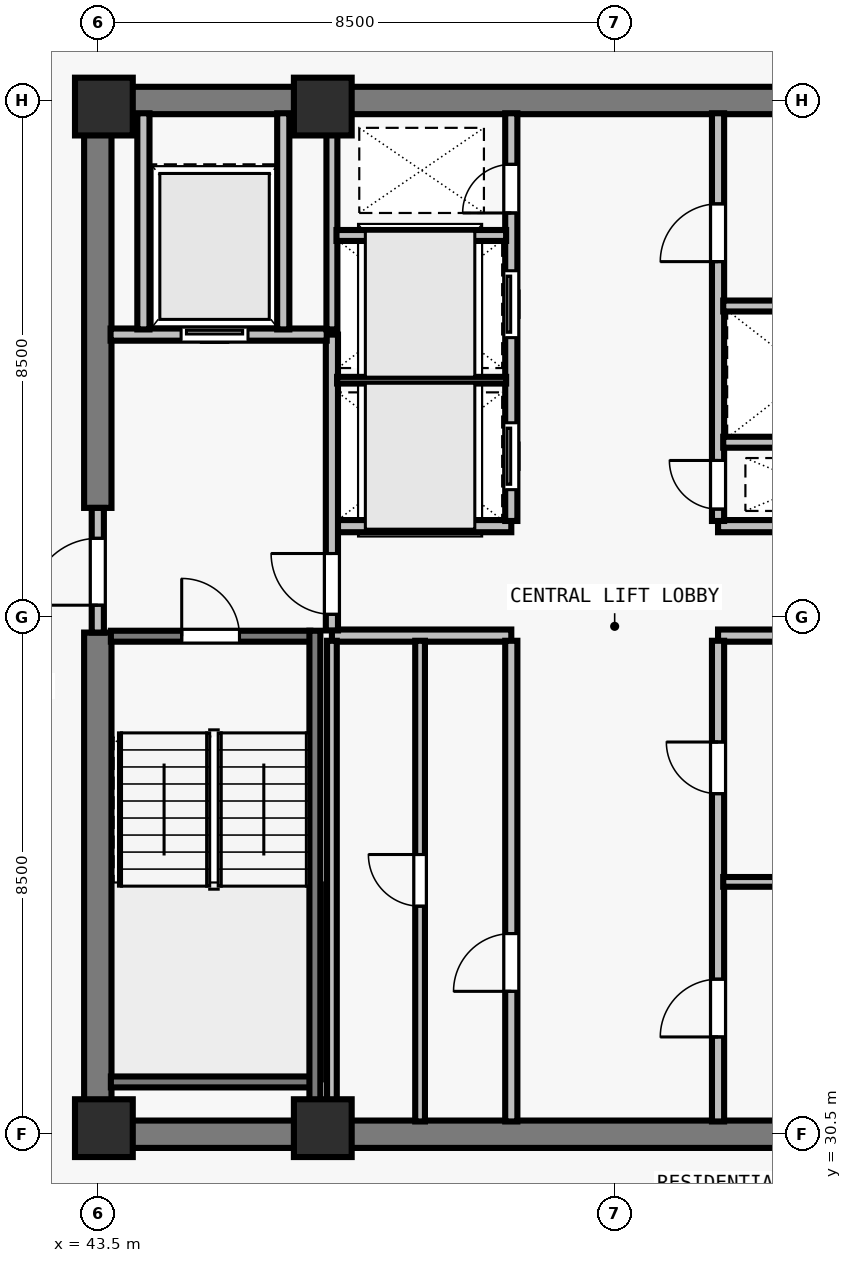
"""IFC4 building model, lengths in metres.
Left out: names, types, materials, properties, quantities, classifications, styles, units other than length and angle.
Written with IfcOpenShell. Run it as: python <this file> out.ifc"""

import sys

from ifc_helpers import new_model, si_unit, direction, frame, frame_2d, origin, origin_2d, place, context, subcontext, project, spatial, rectangle, extrude, element, fill, save


model = new_model("IFC4")
c1 = context("Model", 3, precision=1e-05, world=origin(), true_north=direction((0.0, 1.0)))
c2 = subcontext(c1, "Body", "Model", "MODEL_VIEW")
j1 = project(units=[si_unit("LENGTHUNIT", "METRE"), si_unit("PLANEANGLEUNIT", "RADIAN")], contexts=[c1])
p1 = place(None, origin())
s1 = spatial("IfcSite", under=j1, at=p1, CompositionType="ELEMENT")
p2 = place(p1, origin())
s2 = spatial("IfcBuilding", under=s1, at=p2, CompositionType="ELEMENT")
p3 = place(p2, frame((0.0, 0.0, 209.5)))
s3 = spatial("IfcBuildingStorey", under=s2, at=p3, CompositionType="ELEMENT", Elevation=209.5)
for number, where, z_axis, x_axis in (
    (1, (43.6, 30.6, 0.0), (0.0, 0.0, 1.0), (1.0, 0.0, 0.0)),
    (2, (47.2, 30.6, 0.0), (0.0, 0.0, 1.0), (1.0, 0.0, 0.0)),
    (3, (43.6, 47.4, 0.0), (0.0, 0.0, 1.0), (1.0, 0.0, 0.0)),
    (4, (47.2, 47.4, 0.0), (0.0, 0.0, 1.0), (1.0, 0.0, 0.0)),
):
    element("IfcColumn", number, at=place(p3, frame(where, z_axis=z_axis, x_axis=x_axis)), inside=s3, PredefinedType="COLUMN", context=c2, shape_type="SweptSolid", body=[
        extrude(rectangle(XDim=0.95, YDim=0.95, at=origin_2d()), origin(), (0.0, 0.0, 1.0), 3.5),
    ])
for number, where, z_axis, x_axis in (
    (5, (43.275, 30.5, 0.0), (0.0, 0.0, 1.0), (1.0, 0.0, 0.0)),
    (6, (43.275, 47.5, 0.0), (0.0, 0.0, 1.0), (1.0, 0.0, 0.0)),
):
    element("IfcWall", number, at=place(p3, frame(where, z_axis=z_axis, x_axis=x_axis)), inside=s3, PredefinedType="SHEAR", context=c2, shape_type="SweptSolid", body=[
        extrude(rectangle(XDim=17.45, YDim=0.45, at=frame_2d((8.725, 0.0))), origin(), (0.0, 0.0, 1.0), 3.29),
    ])
p4 = place(p3, frame((43.5, 30.715, 0.0), z_axis=(0.0, 0.0, 1.0), x_axis=(0.0, 1.0, 0.0)))
e7 = element("IfcWall", 7, at=p4, inside=s3, PredefinedType="SHEAR", context=c2, shape_type="SweptSolid", body=[
    extrude(rectangle(XDim=8.035, YDim=0.45, at=frame_2d((4.018, 0.0))), origin(), (0.0, 0.0, 1.0), 3.29),
])
p5 = place(p3, frame((43.5, 40.8, 0.0), z_axis=(0.0, 0.0, 1.0), x_axis=(0.0, 1.0, 0.0)))
e8 = element("IfcWall", 8, at=p5, inside=s3, PredefinedType="SHEAR", context=c2, shape_type="SweptSolid", body=[
    extrude(rectangle(XDim=6.485, YDim=0.45, at=frame_2d((3.242, 0.0))), origin(), (0.0, 0.0, 1.0), 3.29),
])
for number, where, z_axis, x_axis in (
    (9, (47.35, 38.7, 0.0), (0.0, 0.0, 1.0), (1.0, 0.0, 0.0)),
    (10, (47.35, 40.5, 0.0), (0.0, 0.0, 1.0), (1.0, 0.0, 0.0)),
    (11, (53.7, 38.7, 0.0), (0.0, 0.0, 1.0), (1.0, 0.0, 0.0)),
    (12, (53.7, 40.5, 0.0), (0.0, 0.0, 1.0), (1.0, 0.0, 0.0)),
):
    element("IfcWall", number, at=place(p3, frame(where, z_axis=z_axis, x_axis=x_axis)), inside=s3, PredefinedType="SOLIDWALL", context=c2, shape_type="SweptSolid", body=[
        extrude(rectangle(XDim=2.95, YDim=0.2, at=frame_2d((1.475, 0.0))), origin(), (0.0, 0.0, 1.0), 3.29),
    ])
p6 = place(p3, frame((50.3, 30.71, 0.0), z_axis=(0.0, 0.0, 1.0), x_axis=(0.0, 1.0, 0.0)))
e13 = element("IfcWall", 13, at=p6, inside=s3, PredefinedType="SOLIDWALL", context=c2, shape_type="SweptSolid", body=[
    extrude(rectangle(XDim=7.905, YDim=0.2, at=frame_2d((3.953, 0.0))), origin(), (0.0, 0.0, 1.0), 3.29),
])
p7 = place(p6, frame((2.14, 0.0, 0.0)))
e14 = element("IfcOpeningElement", 14, at=p7, cuts=e13, PredefinedType="OPENING", context=c2, shape_type="SweptSolid", body=[
    extrude(rectangle(XDim=0.95, YDim=2.12, at=frame_2d((0.475, 1.06))), frame((0.0, 0.11, 0.0), z_axis=(0.0, -1.0, 0.0), x_axis=(1.0, 0.0, 0.0)), (0.0, 0.0, 1.0), 0.22),
])
p8 = place(p3, frame((53.7, 30.71, 0.0), z_axis=(0.0, 0.0, 1.0), x_axis=(0.0, 1.0, 0.0)))
e15 = element("IfcWall", 15, at=p8, inside=s3, PredefinedType="SOLIDWALL", context=c2, shape_type="SweptSolid", body=[
    extrude(rectangle(XDim=7.905, YDim=0.2, at=frame_2d((3.953, 0.0))), origin(), (0.0, 0.0, 1.0), 3.29),
])
p9 = place(p8, frame((1.39, 0.0, 0.0)))
e16 = element("IfcOpeningElement", 16, at=p9, cuts=e15, PredefinedType="OPENING", context=c2, shape_type="SweptSolid", body=[
    extrude(rectangle(XDim=0.95, YDim=2.12, at=frame_2d((0.475, 1.06))), frame((0.0, 0.11, 0.0), z_axis=(0.0, -1.0, 0.0), x_axis=(1.0, 0.0, 0.0)), (0.0, 0.0, 1.0), 0.22),
])
p10 = place(p8, frame((5.39, 0.0, 0.0)))
e17 = element("IfcOpeningElement", 17, at=p10, cuts=e15, PredefinedType="OPENING", context=c2, shape_type="SweptSolid", body=[
    extrude(rectangle(XDim=0.85, YDim=2.12, at=frame_2d((0.425, 1.06))), frame((0.0, 0.11, 0.0), z_axis=(0.0, -1.0, 0.0), x_axis=(1.0, 0.0, 0.0)), (0.0, 0.0, 1.0), 0.22),
])
p11 = place(p3, frame((50.3, 40.585, 0.0), z_axis=(0.0, 0.0, 1.0), x_axis=(0.0, 1.0, 0.0)))
e18 = element("IfcWall", 18, at=p11, inside=s3, PredefinedType="SOLIDWALL", context=c2, shape_type="SweptSolid", body=[
    extrude(rectangle(XDim=6.705, YDim=0.2, at=frame_2d((3.353, 0.0))), origin(), (0.0, 0.0, 1.0), 3.29),
])
p12 = place(p11, frame((0.515, 0.0, 0.0)))
e19 = element("IfcOpeningElement", 19, at=p12, cuts=e18, PredefinedType="OPENING", context=c2, shape_type="SweptSolid", body=[
    extrude(rectangle(XDim=1.1, YDim=2.2, at=frame_2d((0.55, 1.1))), frame((0.0, 0.11, 0.0), z_axis=(0.0, -1.0, 0.0), x_axis=(1.0, 0.0, 0.0)), (0.0, 0.0, 1.0), 0.22),
])
p13 = place(p11, frame((3.015, 0.0, 0.0)))
e20 = element("IfcOpeningElement", 20, at=p13, cuts=e18, PredefinedType="OPENING", context=c2, shape_type="SweptSolid", body=[
    extrude(rectangle(XDim=1.1, YDim=2.2, at=frame_2d((0.55, 1.1))), frame((0.0, 0.11, 0.0), z_axis=(0.0, -1.0, 0.0), x_axis=(1.0, 0.0, 0.0)), (0.0, 0.0, 1.0), 0.22),
])
p14 = place(p11, frame((5.065, 0.0, 0.0)))
e21 = element("IfcOpeningElement", 21, at=p14, cuts=e18, PredefinedType="OPENING", context=c2, shape_type="SweptSolid", body=[
    extrude(rectangle(XDim=0.8, YDim=2.08, at=frame_2d((0.4, 1.04))), frame((0.0, 0.11, 0.0), z_axis=(0.0, -1.0, 0.0), x_axis=(1.0, 0.0, 0.0)), (0.0, 0.0, 1.0), 0.22),
])
p15 = place(p3, frame((53.7, 40.585, 0.0), z_axis=(0.0, 0.0, 1.0), x_axis=(0.0, 1.0, 0.0)))
e22 = element("IfcWall", 22, at=p15, inside=s3, PredefinedType="SOLIDWALL", context=c2, shape_type="SweptSolid", body=[
    extrude(rectangle(XDim=6.705, YDim=0.2, at=frame_2d((3.353, 0.0))), origin(), (0.0, 0.0, 1.0), 3.29),
])
p16 = place(p15, frame((0.195, 0.0, 0.0)))
e23 = element("IfcOpeningElement", 23, at=p16, cuts=e22, PredefinedType="OPENING", context=c2, shape_type="SweptSolid", body=[
    extrude(rectangle(XDim=0.8, YDim=2.08, at=frame_2d((0.4, 1.04))), frame((0.0, 0.11, 0.0), z_axis=(0.0, -1.0, 0.0), x_axis=(1.0, 0.0, 0.0)), (0.0, 0.0, 1.0), 0.22),
])
p17 = place(p15, frame((4.265, 0.0, 0.0)))
e24 = element("IfcOpeningElement", 24, at=p17, cuts=e22, PredefinedType="OPENING", context=c2, shape_type="SweptSolid", body=[
    extrude(rectangle(XDim=0.95, YDim=2.12, at=frame_2d((0.475, 1.06))), frame((0.0, 0.11, 0.0), z_axis=(0.0, -1.0, 0.0), x_axis=(1.0, 0.0, 0.0)), (0.0, 0.0, 1.0), 0.22),
])
p18 = place(p3, frame((43.5, 38.75, 0.0), z_axis=(0.0, 0.0, 1.0), x_axis=(0.0, 1.0, 0.0)))
e25 = element("IfcWall", 25, at=p18, inside=s3, PredefinedType="SOLIDWALL", context=c2, shape_type="SweptSolid", body=[
    extrude(rectangle(XDim=2.05, YDim=0.2, at=frame_2d((1.025, 0.0))), origin(), (0.0, 0.0, 1.0), 3.29),
])
p19 = place(p18, frame((0.45, 0.0, 0.0)))
e26 = element("IfcOpeningElement", 26, at=p19, cuts=e25, PredefinedType="OPENING", context=c2, shape_type="SweptSolid", body=[
    extrude(rectangle(XDim=1.1, YDim=2.15, at=frame_2d((0.55, 1.075))), frame((0.0, 0.11, 0.0), z_axis=(0.0, -1.0, 0.0), x_axis=(1.0, 0.0, 0.0)), (0.0, 0.0, 1.0), 0.22),
])
p20 = place(p3, frame((47.35, 38.785, 0.0), z_axis=(0.0, 0.0, 1.0), x_axis=(0.0, 1.0, 0.0)))
e27 = element("IfcWall", 27, at=p20, inside=s3, PredefinedType="SOLIDWALL", context=c2, shape_type="SweptSolid", body=[
    extrude(rectangle(XDim=4.865, YDim=0.2, at=frame_2d((2.433, 0.0))), origin(), (0.0, 0.0, 1.0), 3.29),
])
p21 = place(p20, frame((0.265, 0.0, 0.0)))
e28 = element("IfcOpeningElement", 28, at=p21, cuts=e27, PredefinedType="OPENING", context=c2, shape_type="SweptSolid", body=[
    extrude(rectangle(XDim=1.0, YDim=2.15, at=frame_2d((0.5, 1.075))), frame((0.0, 0.11, 0.0), z_axis=(0.0, -1.0, 0.0), x_axis=(1.0, 0.0, 0.0)), (0.0, 0.0, 1.0), 0.22),
])
p22 = place(p3, frame((43.71, 43.65, 0.0), z_axis=(0.0, 0.0, 1.0), x_axis=(1.0, 0.0, 0.0)))
e29 = element("IfcWall", 29, at=p22, inside=s3, PredefinedType="SOLIDWALL", context=c2, shape_type="SweptSolid", body=[
    extrude(rectangle(XDim=3.555, YDim=0.2, at=frame_2d((1.777, 0.0))), origin(), (0.0, 0.0, 1.0), 3.29),
])
p23 = place(p22, frame((1.16, 0.0, 0.0)))
e30 = element("IfcOpeningElement", 30, at=p23, cuts=e29, PredefinedType="OPENING", context=c2, shape_type="SweptSolid", body=[
    extrude(rectangle(XDim=1.1, YDim=2.2, at=frame_2d((0.55, 1.1))), frame((0.0, 0.11, 0.0), z_axis=(0.0, -1.0, 0.0), x_axis=(1.0, 0.0, 0.0)), (0.0, 0.0, 1.0), 0.22),
])
for number, where, z_axis, x_axis in (
    (31, (46.55, 43.735, 0.0), (0.0, 0.0, 1.0), (0.0, 1.0, 0.0)),
    (32, (44.25, 43.735, 0.0), (0.0, 0.0, 1.0), (0.0, 1.0, 0.0)),
):
    element("IfcWall", number, at=place(p3, frame(where, z_axis=z_axis, x_axis=x_axis)), inside=s3, PredefinedType="SOLIDWALL", context=c2, shape_type="SweptSolid", body=[
        extrude(rectangle(XDim=3.555, YDim=0.2, at=frame_2d((1.777, 0.0))), origin(), (0.0, 0.0, 1.0), 3.29),
    ])
p24 = place(p3, frame((47.35, 30.71, 0.0), z_axis=(0.0, 0.0, 1.0), x_axis=(0.0, 1.0, 0.0)))
e33 = element("IfcWall", 33, at=p24, inside=s3, PredefinedType="PARTITIONING", context=c2, shape_type="SweptSolid", body=[
    extrude(rectangle(XDim=7.905, YDim=0.16, at=frame_2d((3.953, 0.0))), origin(), (0.0, 0.0, 1.0), 3.29),
])
p25 = place(p3, frame((48.8, 30.71, 0.0), z_axis=(0.0, 0.0, 1.0), x_axis=(0.0, 1.0, 0.0)))
e34 = element("IfcWall", 34, at=p25, inside=s3, PredefinedType="PARTITIONING", context=c2, shape_type="SweptSolid", body=[
    extrude(rectangle(XDim=7.905, YDim=0.16, at=frame_2d((3.953, 0.0))), origin(), (0.0, 0.0, 1.0), 3.29),
])
p26 = place(p25, frame((3.54, 0.0, 0.0)))
e35 = element("IfcOpeningElement", 35, at=p26, cuts=e34, PredefinedType="OPENING", context=c2, shape_type="SweptSolid", body=[
    extrude(rectangle(XDim=0.85, YDim=2.12, at=frame_2d((0.425, 1.06))), frame((0.0, 0.09, 0.0), z_axis=(0.0, -1.0, 0.0), x_axis=(1.0, 0.0, 0.0)), (0.0, 0.0, 1.0), 0.18),
])
p27 = place(p3, frame((53.785, 34.65, 0.0), z_axis=(0.0, 0.0, 1.0), x_axis=(1.0, 0.0, 0.0)))
e36 = element("IfcWall", 36, at=p27, inside=s3, PredefinedType="PARTITIONING", context=c2, shape_type="SweptSolid", body=[
    extrude(rectangle(XDim=2.8, YDim=0.16, at=frame_2d((1.4, 0.0))), origin(), (0.0, 0.0, 1.0), 3.29),
])
p28 = place(p3, frame((47.35, 43.735, 0.0), z_axis=(0.0, 0.0, 1.0), x_axis=(0.0, 1.0, 0.0)))
e37 = element("IfcWall", 37, at=p28, inside=s3, PredefinedType="SOLIDWALL", context=c2, shape_type="SweptSolid", body=[
    extrude(rectangle(XDim=3.555, YDim=0.18, at=frame_2d((1.777, 0.0))), origin(), (0.0, 0.0, 1.0), 3.29),
])
p29 = place(p3, frame((47.435, 42.9, 0.0), z_axis=(0.0, 0.0, 1.0), x_axis=(1.0, 0.0, 0.0)))
e38 = element("IfcWall", 38, at=p29, inside=s3, PredefinedType="PARTITIONING", context=c2, shape_type="SweptSolid", body=[
    extrude(rectangle(XDim=2.78, YDim=0.11, at=frame_2d((1.39, 0.0))), origin(), (0.0, 0.0, 1.0), 3.29),
])
p30 = place(p3, frame((47.425, 45.28, 0.0), z_axis=(0.0, 0.0, 1.0), x_axis=(1.0, 0.0, 0.0)))
e39 = element("IfcWall", 39, at=p30, inside=s3, PredefinedType="SOLIDWALL", context=c2, shape_type="SweptSolid", body=[
    extrude(rectangle(XDim=2.79, YDim=0.18, at=frame_2d((1.395, 0.0))), origin(), (0.0, 0.0, 1.0), 3.29),
])
p31 = place(p3, frame((53.785, 41.88, 0.0), z_axis=(0.0, 0.0, 1.0), x_axis=(1.0, 0.0, 0.0)))
e40 = element("IfcWall", 40, at=p31, inside=s3, PredefinedType="SOLIDWALL", context=c2, shape_type="SweptSolid", body=[
    extrude(rectangle(XDim=2.78, YDim=0.18, at=frame_2d((1.39, 0.0))), origin(), (0.0, 0.0, 1.0), 3.29),
])
p32 = place(p3, frame((53.785, 44.12, 0.0), z_axis=(0.0, 0.0, 1.0), x_axis=(1.0, 0.0, 0.0)))
e41 = element("IfcWall", 41, at=p32, inside=s3, PredefinedType="SOLIDWALL", context=c2, shape_type="SweptSolid", body=[
    extrude(rectangle(XDim=2.79, YDim=0.18, at=frame_2d((1.395, 0.0))), origin(), (0.0, 0.0, 1.0), 3.29),
])
p33 = place(p3, frame((43.715, 38.69, 0.0), z_axis=(0.0, 0.0, 1.0), x_axis=(1.0, 0.0, 0.0)))
e42 = element("IfcWall", 42, at=p33, inside=s3, PredefinedType="SOLIDWALL", context=c2, shape_type="SweptSolid", body=[
    extrude(rectangle(XDim=3.28, YDim=0.18, at=frame_2d((1.64, 0.0))), origin(), (0.0, 0.0, 1.0), 3.29),
])
p34 = place(p33, frame((1.165, 0.0, 0.0)))
e43 = element("IfcOpeningElement", 43, at=p34, cuts=e42, PredefinedType="OPENING", context=c2, shape_type="SweptSolid", body=[
    extrude(rectangle(XDim=0.95, YDim=2.15, at=frame_2d((0.475, 1.075))), frame((0.0, 0.1, 0.0), z_axis=(0.0, -1.0, 0.0), x_axis=(1.0, 0.0, 0.0)), (0.0, 0.0, 1.0), 0.2),
])
p35 = place(p3, frame((43.715, 31.36, 0.0), z_axis=(0.0, 0.0, 1.0), x_axis=(1.0, 0.0, 0.0)))
e44 = element("IfcWall", 44, at=p35, inside=s3, PredefinedType="SOLIDWALL", context=c2, shape_type="SweptSolid", body=[
    extrude(rectangle(XDim=3.28, YDim=0.18, at=frame_2d((1.64, 0.0))), origin(), (0.0, 0.0, 1.0), 3.29),
])
p36 = place(p3, frame((47.07, 38.78, 0.0), z_axis=(0.0, 0.0, 1.0), x_axis=(0.0, -1.0, 0.0)))
e45 = element("IfcWall", 45, at=p36, inside=s3, PredefinedType="SOLIDWALL", context=c2, shape_type="SweptSolid", body=[
    extrude(rectangle(XDim=8.067, YDim=0.18, at=frame_2d((4.034, 0.0))), origin(), (0.0, 0.0, 1.0), 3.29),
])
p37 = place(p19, origin())
e46 = element("IfcDoor", 46, at=p37, inside=s3, OperationType="SINGLE_SWING_LEFT", PredefinedType="DOOR", context=c2, shape_type="SweptSolid", body=[
    extrude(rectangle(XDim=1.1, YDim=2.15, at=frame_2d((0.55, 1.075))), frame((0.0, 0.025, 0.0), z_axis=(0.0, -1.0, 0.0), x_axis=(1.0, 0.0, 0.0)), (0.0, 0.0, 1.0), 0.05),
])
fill(e26, e46)
p38 = place(p21, origin())
e47 = element("IfcDoor", 47, at=p38, inside=s3, OperationType="SINGLE_SWING_RIGHT", PredefinedType="DOOR", context=c2, shape_type="SweptSolid", body=[
    extrude(rectangle(XDim=1.0, YDim=2.15, at=frame_2d((0.5, 1.075))), frame((0.0, 0.025, 0.0), z_axis=(0.0, -1.0, 0.0), x_axis=(1.0, 0.0, 0.0)), (0.0, 0.0, 1.0), 0.05),
])
fill(e28, e47)
p39 = place(p23, origin())
e48 = element("IfcDoor", 48, at=p39, inside=s3, OperationType="SLIDING_TO_LEFT", PredefinedType="DOOR", context=c2, shape_type="SweptSolid", body=[
    extrude(rectangle(XDim=1.1, YDim=2.2, at=frame_2d((0.55, 1.1))), frame((0.0, 0.025, 0.0), z_axis=(0.0, -1.0, 0.0), x_axis=(1.0, 0.0, 0.0)), (0.0, 0.0, 1.0), 0.05),
])
fill(e30, e48)
p40 = place(p7, origin())
e49 = element("IfcDoor", 49, at=p40, inside=s3, OperationType="SINGLE_SWING_LEFT", PredefinedType="DOOR", context=c2, shape_type="SweptSolid", body=[
    extrude(rectangle(XDim=0.95, YDim=2.12, at=frame_2d((0.475, 1.06))), frame((0.0, 0.025, 0.0), z_axis=(0.0, -1.0, 0.0), x_axis=(1.0, 0.0, 0.0)), (0.0, 0.0, 1.0), 0.05),
])
fill(e14, e49)
p41 = place(p26, origin())
e50 = element("IfcDoor", 50, at=p41, inside=s3, OperationType="SINGLE_SWING_RIGHT", PredefinedType="DOOR", context=c2, shape_type="SweptSolid", body=[
    extrude(rectangle(XDim=0.85, YDim=2.12, at=frame_2d((0.425, 1.06))), frame((0.0, 0.025, 0.0), z_axis=(0.0, -1.0, 0.0), x_axis=(1.0, 0.0, 0.0)), (0.0, 0.0, 1.0), 0.05),
])
fill(e35, e50)
p42 = place(p9, origin())
e51 = element("IfcDoor", 51, at=p42, inside=s3, OperationType="SINGLE_SWING_LEFT", PredefinedType="DOOR", context=c2, shape_type="SweptSolid", body=[
    extrude(rectangle(XDim=0.95, YDim=2.12, at=frame_2d((0.475, 1.06))), frame((0.0, 0.025, 0.0), z_axis=(0.0, -1.0, 0.0), x_axis=(1.0, 0.0, 0.0)), (0.0, 0.0, 1.0), 0.05),
])
fill(e16, e51)
p43 = place(p10, origin())
e52 = element("IfcDoor", 52, at=p43, inside=s3, OperationType="SINGLE_SWING_RIGHT", PredefinedType="DOOR", context=c2, shape_type="SweptSolid", body=[
    extrude(rectangle(XDim=0.85, YDim=2.12, at=frame_2d((0.425, 1.06))), frame((0.0, 0.025, 0.0), z_axis=(0.0, -1.0, 0.0), x_axis=(1.0, 0.0, 0.0)), (0.0, 0.0, 1.0), 0.05),
])
fill(e17, e52)
p44 = place(p12, origin())
e53 = element("IfcDoor", 53, at=p44, inside=s3, OperationType="SLIDING_TO_LEFT", PredefinedType="DOOR", context=c2, shape_type="SweptSolid", body=[
    extrude(rectangle(XDim=1.1, YDim=2.2, at=frame_2d((0.55, 1.1))), frame((0.0, 0.025, 0.0), z_axis=(0.0, -1.0, 0.0), x_axis=(1.0, 0.0, 0.0)), (0.0, 0.0, 1.0), 0.05),
])
fill(e19, e53)
p45 = place(p13, origin())
e54 = element("IfcDoor", 54, at=p45, inside=s3, OperationType="SLIDING_TO_LEFT", PredefinedType="DOOR", context=c2, shape_type="SweptSolid", body=[
    extrude(rectangle(XDim=1.1, YDim=2.2, at=frame_2d((0.55, 1.1))), frame((0.0, 0.025, 0.0), z_axis=(0.0, -1.0, 0.0), x_axis=(1.0, 0.0, 0.0)), (0.0, 0.0, 1.0), 0.05),
])
fill(e20, e54)
p46 = place(p14, origin())
e55 = element("IfcDoor", 55, at=p46, inside=s3, OperationType="SINGLE_SWING_LEFT", PredefinedType="DOOR", context=c2, shape_type="SweptSolid", body=[
    extrude(rectangle(XDim=0.8, YDim=2.08, at=frame_2d((0.4, 1.04))), frame((0.0, 0.025, 0.0), z_axis=(0.0, -1.0, 0.0), x_axis=(1.0, 0.0, 0.0)), (0.0, 0.0, 1.0), 0.05),
])
fill(e21, e55)
p47 = place(p16, origin())
e56 = element("IfcDoor", 56, at=p47, inside=s3, OperationType="SINGLE_SWING_RIGHT", PredefinedType="DOOR", context=c2, shape_type="SweptSolid", body=[
    extrude(rectangle(XDim=0.8, YDim=2.08, at=frame_2d((0.4, 1.04))), frame((0.0, 0.025, 0.0), z_axis=(0.0, -1.0, 0.0), x_axis=(1.0, 0.0, 0.0)), (0.0, 0.0, 1.0), 0.05),
])
fill(e23, e56)
p48 = place(p17, origin())
e57 = element("IfcDoor", 57, at=p48, inside=s3, OperationType="SINGLE_SWING_LEFT", PredefinedType="DOOR", context=c2, shape_type="SweptSolid", body=[
    extrude(rectangle(XDim=0.95, YDim=2.12, at=frame_2d((0.475, 1.06))), frame((0.0, 0.025, 0.0), z_axis=(0.0, -1.0, 0.0), x_axis=(1.0, 0.0, 0.0)), (0.0, 0.0, 1.0), 0.05),
])
fill(e24, e57)
p49 = place(p34, origin())
e58 = element("IfcDoor", 58, at=p49, inside=s3, OperationType="SINGLE_SWING_LEFT", PredefinedType="DOOR", context=c2, shape_type="SweptSolid", body=[
    extrude(rectangle(XDim=0.95, YDim=2.15, at=frame_2d((0.475, 1.075))), frame((0.0, 0.025, 0.0), z_axis=(0.0, -1.0, 0.0), x_axis=(1.0, 0.0, 0.0)), (0.0, 0.0, 1.0), 0.05),
])
fill(e43, e58)
save(model, sys.argv[1])
